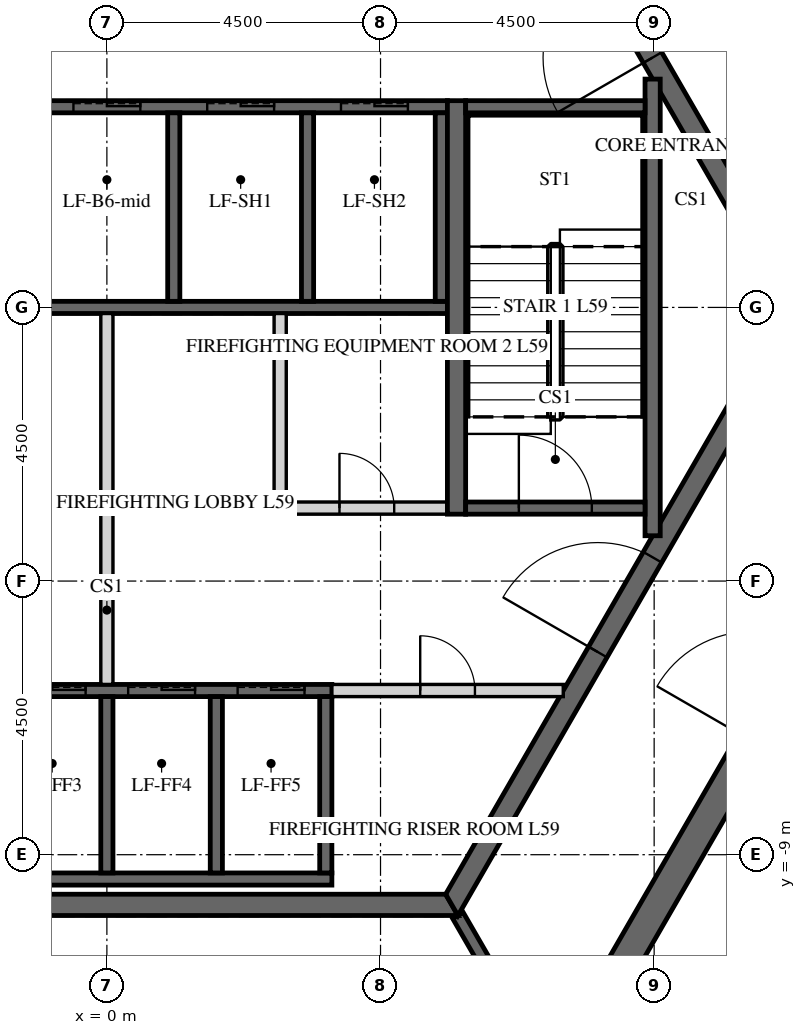
"""IFC4 building model, lengths in metres.
Left out: names, types, materials, properties, quantities, classifications, styles, units other than length and angle.
Written with IfcOpenShell. Run it as: python <this file> out.ifc"""

import sys

from ifc_helpers import new_model, si_unit, direction, frame, frame_2d, origin, place, context, subcontext, project, spatial, polyline, rectangle, outline, extrude, element, fill, save


model = new_model("IFC4")
c1 = context("Model", 3, precision=1e-05, world=origin(), true_north=direction((0.0, 1.0)))
c2 = subcontext(c1, "Body", "Model", "MODEL_VIEW")
j1 = project(units=[si_unit("LENGTHUNIT", "METRE"), si_unit("PLANEANGLEUNIT", "RADIAN")], contexts=[c1])
p1 = place(None, origin())
s1 = spatial("IfcSite", under=j1, at=p1, CompositionType="ELEMENT")
p2 = place(p1, origin())
s2 = spatial("IfcBuilding", under=s1, at=p2, CompositionType="ELEMENT")
p3 = place(p2, frame((0.0, 0.0, 246.3)))
s3 = spatial("IfcBuildingStorey", under=s2, at=p3, CompositionType="ELEMENT", Elevation=246.3)
p4 = place(p3, frame((7.361, -12.75, -0.15), z_axis=(0.0, 0.0, 1.0), x_axis=(0.50000571537, 0.866022103989, 0.0)))
e1 = element("IfcWall", 1, at=p4, inside=s3, PredefinedType="SHEAR", context=c2, shape_type="SweptSolid", body=[
    extrude(outline(polyline([(-0.144, -0.25), (14.867, -0.25), (14.578, 0.25), (0.144, 0.25), (-0.144, -0.25)])), origin(), (0.0, 0.0, 1.0), 3.75),
])
p5 = place(p4, frame((6.49, 0.0, 0.15)))
e2 = element("IfcOpeningElement", 2, at=p5, cuts=e1, PredefinedType="OPENING", context=c2, shape_type="SweptSolid", body=[
    extrude(rectangle(XDim=1.8, YDim=2.4, at=frame_2d((0.9, 1.2))), frame((0.0, 0.26, 0.0), z_axis=(0.0, -1.0, 0.0), x_axis=(1.0, 0.0, 0.0)), (0.0, 0.0, 1.0), 0.52),
])
p6 = place(p3, frame((14.722, 0.0, -0.15), z_axis=(0.0, 0.0, 1.0), x_axis=(-0.50000571537, 0.866022103989, 0.0)))
e3 = element("IfcWall", 3, at=p6, inside=s3, PredefinedType="SHEAR", context=c2, shape_type="SweptSolid", body=[
    extrude(outline(polyline([(-0.144, -0.25), (14.867, -0.25), (14.578, 0.25), (0.144, 0.25), (-0.144, -0.25)])), origin(), (0.0, 0.0, 1.0), 3.75),
])
p7 = place(p6, frame((6.432, 0.0, 0.15)))
e4 = element("IfcOpeningElement", 4, at=p7, cuts=e3, PredefinedType="OPENING", context=c2, shape_type="SweptSolid", body=[
    extrude(rectangle(XDim=1.8, YDim=2.4, at=frame_2d((0.9, 1.2))), frame((0.0, 0.26, 0.0), z_axis=(0.0, -1.0, 0.0), x_axis=(1.0, 0.0, 0.0)), (0.0, 0.0, 1.0), 0.52),
])
p8 = place(p3, frame((-5.673, -9.825, -0.15), z_axis=(0.0, 0.0, 1.0), x_axis=(1.0, 0.0, 0.0)))
e5 = element("IfcWall", 5, at=p8, inside=s3, PredefinedType="SHEAR", context=c2, shape_type="SweptSolid", body=[
    extrude(outline(polyline([(-0.101, -0.175), (11.446, -0.175), (11.244, 0.175), (0.101, 0.175), (-0.101, -0.175)])), origin(), (0.0, 0.0, 1.0), 3.75),
])
p9 = place(p3, frame((5.673, -9.825, -0.15), z_axis=(0.0, 0.0, 1.0), x_axis=(0.499995046907, 0.866028263435, 0.0)))
e6 = element("IfcWall", 6, at=p9, inside=s3, PredefinedType="SHEAR", context=c2, shape_type="SweptSolid", body=[
    extrude(outline(polyline([(-0.101, -0.175), (11.446, -0.175), (11.244, 0.175), (0.101, 0.175), (-0.101, -0.175)])), origin(), (0.0, 0.0, 1.0), 3.75),
])
p10 = place(p9, frame((4.801, 0.0, 0.15)))
e7 = element("IfcOpeningElement", 7, at=p10, cuts=e6, PredefinedType="OPENING", context=c2, shape_type="SweptSolid", body=[
    extrude(rectangle(XDim=1.8, YDim=2.4, at=frame_2d((0.9, 1.2))), frame((0.0, 0.185, 0.0), z_axis=(0.0, -1.0, 0.0), x_axis=(1.0, 0.0, 0.0)), (0.0, 0.0, 1.0), 0.37),
])
p11 = place(p3, frame((11.345, 0.0, -0.15), z_axis=(0.0, 0.0, 1.0), x_axis=(-0.499995046907, 0.866028263435, 0.0)))
e8 = element("IfcWall", 8, at=p11, inside=s3, PredefinedType="SHEAR", context=c2, shape_type="SweptSolid", body=[
    extrude(outline(polyline([(-0.101, -0.175), (11.446, -0.175), (11.244, 0.175), (0.101, 0.175), (-0.101, -0.175)])), origin(), (0.0, 0.0, 1.0), 3.75),
])
p12 = place(p11, frame((4.744, 0.0, 0.15)))
e9 = element("IfcOpeningElement", 9, at=p12, cuts=e8, PredefinedType="OPENING", context=c2, shape_type="SweptSolid", body=[
    extrude(rectangle(XDim=1.8, YDim=2.4, at=frame_2d((0.9, 1.2))), frame((0.0, 0.185, 0.0), z_axis=(0.0, -1.0, 0.0), x_axis=(1.0, 0.0, 0.0)), (0.0, 0.0, 1.0), 0.37),
])
p13 = place(p3, frame((-5.6, 3.3, -0.25), z_axis=(0.0, 0.0, 1.0), x_axis=(1.0, 0.0, 0.0)))
e10 = element("IfcWall", 10, at=p13, inside=s3, PredefinedType="SHEAR", context=c2, shape_type="SweptSolid", body=[
    extrude(rectangle(XDim=11.2, YDim=0.2, at=frame_2d((5.6, 0.0))), origin(), (0.0, 0.0, 1.0), 3.9),
])
p14 = place(p13, frame((0.65, 0.0, 0.25)))
e11 = element("IfcOpeningElement", 11, at=p14, cuts=e10, PredefinedType="OPENING", context=c2, shape_type="SweptSolid", body=[
    extrude(rectangle(XDim=1.1, YDim=2.1, at=frame_2d((0.55, 1.05))), frame((0.0, 0.11, 0.0), z_axis=(0.0, -1.0, 0.0), x_axis=(1.0, 0.0, 0.0)), (0.0, 0.0, 1.0), 0.22),
])
p15 = place(p13, frame((2.85, 0.0, 0.25)))
e12 = element("IfcOpeningElement", 12, at=p15, cuts=e10, PredefinedType="OPENING", context=c2, shape_type="SweptSolid", body=[
    extrude(rectangle(XDim=1.1, YDim=2.1, at=frame_2d((0.55, 1.05))), frame((0.0, 0.11, 0.0), z_axis=(0.0, -1.0, 0.0), x_axis=(1.0, 0.0, 0.0)), (0.0, 0.0, 1.0), 0.22),
])
p16 = place(p13, frame((5.05, 0.0, 0.25)))
e13 = element("IfcOpeningElement", 13, at=p16, cuts=e10, PredefinedType="OPENING", context=c2, shape_type="SweptSolid", body=[
    extrude(rectangle(XDim=1.1, YDim=2.1, at=frame_2d((0.55, 1.05))), frame((0.0, 0.11, 0.0), z_axis=(0.0, -1.0, 0.0), x_axis=(1.0, 0.0, 0.0)), (0.0, 0.0, 1.0), 0.22),
])
p17 = place(p13, frame((7.25, 0.0, 0.25)))
e14 = element("IfcOpeningElement", 14, at=p17, cuts=e10, PredefinedType="OPENING", context=c2, shape_type="SweptSolid", body=[
    extrude(rectangle(XDim=1.1, YDim=2.1, at=frame_2d((0.55, 1.05))), frame((0.0, 0.11, 0.0), z_axis=(0.0, -1.0, 0.0), x_axis=(1.0, 0.0, 0.0)), (0.0, 0.0, 1.0), 0.22),
])
p18 = place(p13, frame((9.45, 0.0, 0.25)))
e15 = element("IfcOpeningElement", 15, at=p18, cuts=e10, PredefinedType="OPENING", context=c2, shape_type="SweptSolid", body=[
    extrude(rectangle(XDim=1.1, YDim=2.1, at=frame_2d((0.55, 1.05))), frame((0.0, 0.11, 0.0), z_axis=(0.0, -1.0, 0.0), x_axis=(1.0, 0.0, 0.0)), (0.0, 0.0, 1.0), 0.22),
])
p19 = place(p3, frame((-5.6, 0.0, -0.25), z_axis=(0.0, 0.0, 1.0), x_axis=(1.0, 0.0, 0.0)))
e16 = element("IfcWall", 16, at=p19, inside=s3, PredefinedType="SHEAR", context=c2, shape_type="SweptSolid", body=[
    extrude(rectangle(XDim=11.2, YDim=0.2, at=frame_2d((5.6, 0.0))), origin(), (0.0, 0.0, 1.0), 3.9),
])
for number, where, z_axis, x_axis in (
    (17, (1.1, 0.1, -0.25), (0.0, 0.0, 1.0), (0.0, 1.0, 0.0)),
    (18, (3.3, 0.1, -0.25), (0.0, 0.0, 1.0), (0.0, 1.0, 0.0)),
    (19, (5.5, 0.1, -0.25), (0.0, 0.0, 1.0), (0.0, 1.0, 0.0)),
):
    element("IfcWall", number, at=place(p3, frame(where, z_axis=z_axis, x_axis=x_axis)), inside=s3, PredefinedType="SHEAR", context=c2, shape_type="SweptSolid", body=[
        extrude(rectangle(XDim=3.1, YDim=0.2, at=frame_2d((1.55, 0.0))), origin(), (0.0, 0.0, 1.0), 3.9),
    ])
p20 = place(p3, frame((-5.5, -6.3, -0.25), z_axis=(0.0, 0.0, 1.0), x_axis=(1.0, 0.0, 0.0)))
e20 = element("IfcWall", 20, at=p20, inside=s3, PredefinedType="SHEAR", context=c2, shape_type="SweptSolid", body=[
    extrude(rectangle(XDim=9.2, YDim=0.2, at=frame_2d((4.6, 0.0))), origin(), (0.0, 0.0, 1.0), 3.9),
])
p21 = place(p20, frame((0.45, 0.0, 0.25)))
e21 = element("IfcOpeningElement", 21, at=p21, cuts=e20, PredefinedType="OPENING", context=c2, shape_type="SweptSolid", body=[
    extrude(rectangle(XDim=1.1, YDim=2.1, at=frame_2d((0.55, 1.05))), frame((0.0, 0.11, 0.0), z_axis=(0.0, -1.0, 0.0), x_axis=(1.0, 0.0, 0.0)), (0.0, 0.0, 1.0), 0.22),
])
p22 = place(p20, frame((2.25, 0.0, 0.25)))
e22 = element("IfcOpeningElement", 22, at=p22, cuts=e20, PredefinedType="OPENING", context=c2, shape_type="SweptSolid", body=[
    extrude(rectangle(XDim=1.1, YDim=2.1, at=frame_2d((0.55, 1.05))), frame((0.0, 0.11, 0.0), z_axis=(0.0, -1.0, 0.0), x_axis=(1.0, 0.0, 0.0)), (0.0, 0.0, 1.0), 0.22),
])
p23 = place(p20, frame((4.05, 0.0, 0.25)))
e23 = element("IfcOpeningElement", 23, at=p23, cuts=e20, PredefinedType="OPENING", context=c2, shape_type="SweptSolid", body=[
    extrude(rectangle(XDim=1.1, YDim=2.1, at=frame_2d((0.55, 1.05))), frame((0.0, 0.11, 0.0), z_axis=(0.0, -1.0, 0.0), x_axis=(1.0, 0.0, 0.0)), (0.0, 0.0, 1.0), 0.22),
])
p24 = place(p20, frame((5.85, 0.0, 0.25)))
e24 = element("IfcOpeningElement", 24, at=p24, cuts=e20, PredefinedType="OPENING", context=c2, shape_type="SweptSolid", body=[
    extrude(rectangle(XDim=1.1, YDim=2.1, at=frame_2d((0.55, 1.05))), frame((0.0, 0.11, 0.0), z_axis=(0.0, -1.0, 0.0), x_axis=(1.0, 0.0, 0.0)), (0.0, 0.0, 1.0), 0.22),
])
p25 = place(p20, frame((7.65, 0.0, 0.25)))
e25 = element("IfcOpeningElement", 25, at=p25, cuts=e20, PredefinedType="OPENING", context=c2, shape_type="SweptSolid", body=[
    extrude(rectangle(XDim=1.1, YDim=2.1, at=frame_2d((0.55, 1.05))), frame((0.0, 0.11, 0.0), z_axis=(0.0, -1.0, 0.0), x_axis=(1.0, 0.0, 0.0)), (0.0, 0.0, 1.0), 0.22),
])
p26 = place(p3, frame((-5.5, -9.4, -0.25), z_axis=(0.0, 0.0, 1.0), x_axis=(1.0, 0.0, 0.0)))
e26 = element("IfcWall", 26, at=p26, inside=s3, PredefinedType="SHEAR", context=c2, shape_type="SweptSolid", body=[
    extrude(rectangle(XDim=9.2, YDim=0.2, at=frame_2d((4.6, 0.0))), origin(), (0.0, 0.0, 1.0), 3.9),
])
for number, where, z_axis, x_axis in (
    (27, (0.0, -9.3, -0.25), (0.0, 0.0, 1.0), (0.0, 1.0, 0.0)),
    (28, (1.8, -9.3, -0.25), (0.0, 0.0, 1.0), (0.0, 1.0, 0.0)),
    (29, (3.6, -9.3, -0.25), (0.0, 0.0, 1.0), (0.0, 1.0, 0.0)),
):
    element("IfcWall", number, at=place(p3, frame(where, z_axis=z_axis, x_axis=x_axis)), inside=s3, PredefinedType="SHEAR", context=c2, shape_type="SweptSolid", body=[
        extrude(rectangle(XDim=2.9, YDim=0.2, at=frame_2d((1.45, 0.0))), origin(), (0.0, 0.0, 1.0), 3.9),
    ])
p27 = place(p3, frame((2.75, -3.3, 0.0), z_axis=(0.0, 0.0, 1.0), x_axis=(1.0, 0.0, 0.0)))
e30 = element("IfcWall", 30, at=p27, inside=s3, PredefinedType="PARTITIONING", context=c2, shape_type="SweptSolid", body=[
    extrude(rectangle(XDim=2.85, YDim=0.2, at=frame_2d((1.425, 0.0))), origin(), (0.0, 0.0, 1.0), 3.65),
])
p28 = place(p27, frame((1.075, 0.0, 0.0)))
e31 = element("IfcOpeningElement", 31, at=p28, cuts=e30, PredefinedType="OPENING", context=c2, shape_type="SweptSolid", body=[
    extrude(rectangle(XDim=0.9, YDim=2.1, at=frame_2d((0.45, 1.05))), frame((0.0, 0.11, 0.0), z_axis=(0.0, -1.0, 0.0), x_axis=(1.0, 0.0, 0.0)), (0.0, 0.0, 1.0), 0.22),
])
p29 = place(p3, frame((2.85, -3.2, 0.0), z_axis=(0.0, 0.0, 1.0), x_axis=(0.0, 1.0, 0.0)))
e32 = element("IfcWall", 32, at=p29, inside=s3, PredefinedType="PARTITIONING", context=c2, shape_type="SweptSolid", body=[
    extrude(rectangle(XDim=3.1, YDim=0.2, at=frame_2d((1.55, 0.0))), origin(), (0.0, 0.0, 1.0), 3.65),
])
p30 = place(p3, frame((0.0, -6.2, 0.0), z_axis=(0.0, 0.0, 1.0), x_axis=(0.0, 1.0, 0.0)))
e33 = element("IfcWall", 33, at=p30, inside=s3, PredefinedType="PARTITIONING", context=c2, shape_type="SweptSolid", body=[
    extrude(rectangle(XDim=6.1, YDim=0.2, at=frame_2d((3.05, 0.0))), origin(), (0.0, 0.0, 1.0), 3.65),
])
p31 = place(p3, frame((3.7, -6.3, 0.0), z_axis=(0.0, 0.0, 1.0), x_axis=(1.0, 0.0, 0.0)))
e34 = element("IfcWall", 34, at=p31, inside=s3, PredefinedType="PARTITIONING", context=c2, shape_type="SweptSolid", body=[
    extrude(rectangle(XDim=3.806, YDim=0.2, at=frame_2d((1.903, 0.0))), origin(), (0.0, 0.0, 1.0), 3.65),
])
p32 = place(p31, frame((1.453, 0.0, 0.0)))
e35 = element("IfcOpeningElement", 35, at=p32, cuts=e34, PredefinedType="OPENING", context=c2, shape_type="SweptSolid", body=[
    extrude(rectangle(XDim=0.9, YDim=2.1, at=frame_2d((0.45, 1.05))), frame((0.0, 0.11, 0.0), z_axis=(0.0, -1.0, 0.0), x_axis=(1.0, 0.0, 0.0)), (0.0, 0.0, 1.0), 0.22),
])
p33 = place(p3, frame((5.773, -10.0, -0.15), z_axis=(0.0, 0.0, 1.0), x_axis=(0.499995765644, -0.866027848477, 0.0)))
e36 = element("IfcWall", 36, at=p33, inside=s3, PredefinedType="SHEAR", context=c2, shape_type="SweptSolid", body=[
    extrude(rectangle(XDim=2.887, YDim=0.2, at=frame_2d((1.443, 0.0))), origin(), (0.0, 0.0, 1.0), 3.75),
])
p34 = place(p3, frame((5.75, -3.4, -0.25), z_axis=(0.0, 0.0, 1.0), x_axis=(0.0, 1.0, 0.0)))
e37 = element("IfcWall", 37, at=p34, inside=s3, PredefinedType="SHEAR", context=c2, shape_type="SweptSolid", body=[
    extrude(rectangle(XDim=6.8, YDim=0.3, at=frame_2d((3.4, 0.0))), origin(), (0.0, 0.0, 1.0), 3.9),
])
p35 = place(p3, frame((8.975, -3.755, -0.25), z_axis=(0.0, 0.0, 1.0), x_axis=(0.0, 1.0, 0.0)))
e38 = element("IfcWall", 38, at=p35, inside=s3, PredefinedType="SHEAR", context=c2, shape_type="SweptSolid", body=[
    extrude(rectangle(XDim=7.51, YDim=0.25, at=frame_2d((3.755, 0.0))), origin(), (0.0, 0.0, 1.0), 3.9),
])
p36 = place(p3, frame((5.9, 3.3, -0.25), z_axis=(0.0, 0.0, 1.0), x_axis=(1.0, 0.0, 0.0)))
e39 = element("IfcWall", 39, at=p36, inside=s3, PredefinedType="SHEAR", context=c2, shape_type="SweptSolid", body=[
    extrude(rectangle(XDim=2.95, YDim=0.2, at=frame_2d((1.475, 0.0))), origin(), (0.0, 0.0, 1.0), 3.9),
])
p37 = place(p3, frame((5.9, -3.3, -0.25), z_axis=(0.0, 0.0, 1.0), x_axis=(1.0, 0.0, 0.0)))
e40 = element("IfcWall", 40, at=p37, inside=s3, PredefinedType="SHEAR", context=c2, shape_type="SweptSolid", body=[
    extrude(rectangle(XDim=2.95, YDim=0.2, at=frame_2d((1.475, 0.0))), origin(), (0.0, 0.0, 1.0), 3.9),
])
p38 = place(p37, frame((0.875, 0.0, 0.25)))
e41 = element("IfcOpeningElement", 41, at=p38, cuts=e40, PredefinedType="OPENING", context=c2, shape_type="SweptSolid", body=[
    extrude(rectangle(XDim=1.2, YDim=2.4, at=frame_2d((0.6, 1.2))), frame((0.0, 0.11, 0.0), z_axis=(0.0, -1.0, 0.0), x_axis=(1.0, 0.0, 0.0)), (0.0, 0.0, 1.0), 0.22),
])
p39 = place(p3, frame((9.887, -12.875, 0.0), z_axis=(0.0, 0.0, 1.0), x_axis=(0.499998228944, 0.866026426302, 0.0)))
e42 = element("IfcWall", 42, at=p39, inside=s3, PredefinedType="PARTITIONING", context=c2, shape_type="SweptSolid", body=[
    extrude(rectangle(XDim=14.867, YDim=0.15, at=frame_2d((7.433, 0.0))), origin(), (0.0, 0.0, 1.0), 2.838),
])
p40 = place(p39, frame((3.519, 0.0, 0.0)))
e43 = element("IfcOpeningElement", 43, at=p40, cuts=e42, PredefinedType="OPENING", context=c2, shape_type="SweptSolid", body=[
    extrude(rectangle(XDim=1.0, YDim=2.1, at=frame_2d((0.5, 1.05))), frame((0.0, 0.085, 0.0), z_axis=(0.0, -1.0, 0.0), x_axis=(1.0, 0.0, 0.0)), (0.0, 0.0, 1.0), 0.17),
])
p41 = place(p39, frame((7.324, 0.0, 0.0)))
e44 = element("IfcOpeningElement", 44, at=p41, cuts=e42, PredefinedType="OPENING", context=c2, shape_type="SweptSolid", body=[
    extrude(rectangle(XDim=1.0, YDim=2.1, at=frame_2d((0.5, 1.05))), frame((0.0, 0.085, 0.0), z_axis=(0.0, -1.0, 0.0), x_axis=(1.0, 0.0, 0.0)), (0.0, 0.0, 1.0), 0.17),
])
p42 = place(p39, frame((13.717, 0.0, 0.0)))
e45 = element("IfcOpeningElement", 45, at=p42, cuts=e42, PredefinedType="OPENING", context=c2, shape_type="SweptSolid", body=[
    extrude(rectangle(XDim=1.0, YDim=2.1, at=frame_2d((0.5, 1.05))), frame((0.0, 0.085, 0.0), z_axis=(0.0, -1.0, 0.0), x_axis=(1.0, 0.0, 0.0)), (0.0, 0.0, 1.0), 0.17),
])
p43 = place(p3, frame((17.277, 0.075, 0.0), z_axis=(0.0, 0.0, 1.0), x_axis=(-0.499998228944, 0.866026426302, 0.0)))
e46 = element("IfcWall", 46, at=p43, inside=s3, PredefinedType="PARTITIONING", context=c2, shape_type="SweptSolid", body=[
    extrude(rectangle(XDim=14.867, YDim=0.15, at=frame_2d((7.433, 0.0))), origin(), (0.0, 0.0, 1.0), 2.838),
])
p44 = place(p43, frame((4.345, 0.0, 0.0)))
e47 = element("IfcOpeningElement", 47, at=p44, cuts=e46, PredefinedType="OPENING", context=c2, shape_type="SweptSolid", body=[
    extrude(rectangle(XDim=1.0, YDim=2.1, at=frame_2d((0.5, 1.05))), frame((0.0, 0.085, 0.0), z_axis=(0.0, -1.0, 0.0), x_axis=(1.0, 0.0, 0.0)), (0.0, 0.0, 1.0), 0.17),
])
p45 = place(p43, frame((8.51, 0.0, 0.0)))
e48 = element("IfcOpeningElement", 48, at=p45, cuts=e46, PredefinedType="OPENING", context=c2, shape_type="SweptSolid", body=[
    extrude(rectangle(XDim=1.0, YDim=2.1, at=frame_2d((0.5, 1.05))), frame((0.0, 0.085, 0.0), z_axis=(0.0, -1.0, 0.0), x_axis=(1.0, 0.0, 0.0)), (0.0, 0.0, 1.0), 0.17),
])
p46 = place(p12, origin())
e49 = element("IfcDoor", 49, at=p46, inside=s3, OperationType="DOUBLE_DOOR_SINGLE_SWING", PredefinedType="DOOR", context=c2, shape_type="SweptSolid", body=[
    extrude(rectangle(XDim=1.8, YDim=2.4, at=frame_2d((0.9, 1.2))), frame((0.0, 0.025, 0.0), z_axis=(0.0, -1.0, 0.0), x_axis=(1.0, 0.0, 0.0)), (0.0, 0.0, 1.0), 0.05),
])
fill(e9, e49)
p47 = place(p10, origin())
e50 = element("IfcDoor", 50, at=p47, inside=s3, OperationType="DOUBLE_DOOR_SINGLE_SWING", PredefinedType="DOOR", context=c2, shape_type="SweptSolid", body=[
    extrude(rectangle(XDim=1.8, YDim=2.4, at=frame_2d((0.9, 1.2))), frame((0.0, 0.025, 0.0), z_axis=(0.0, -1.0, 0.0), x_axis=(1.0, 0.0, 0.0)), (0.0, 0.0, 1.0), 0.05),
])
fill(e7, e50)
p48 = place(p28, origin())
e51 = element("IfcDoor", 51, at=p48, inside=s3, OperationType="SINGLE_SWING_LEFT", PredefinedType="DOOR", context=c2, shape_type="SweptSolid", body=[
    extrude(rectangle(XDim=0.9, YDim=2.1, at=frame_2d((0.45, 1.05))), frame((0.0, 0.025, 0.0), z_axis=(0.0, -1.0, 0.0), x_axis=(1.0, 0.0, 0.0)), (0.0, 0.0, 1.0), 0.05),
])
fill(e31, e51)
p49 = place(p32, origin())
e52 = element("IfcDoor", 52, at=p49, inside=s3, OperationType="SINGLE_SWING_LEFT", PredefinedType="DOOR", context=c2, shape_type="SweptSolid", body=[
    extrude(rectangle(XDim=0.9, YDim=2.1, at=frame_2d((0.45, 1.05))), frame((0.0, 0.025, 0.0), z_axis=(0.0, -1.0, 0.0), x_axis=(1.0, 0.0, 0.0)), (0.0, 0.0, 1.0), 0.05),
])
fill(e35, e52)
p50 = place(p38, origin())
e53 = element("IfcDoor", 53, at=p50, inside=s3, OperationType="SINGLE_SWING_LEFT", PredefinedType="DOOR", context=c2, shape_type="SweptSolid", body=[
    extrude(rectangle(XDim=1.2, YDim=2.4, at=frame_2d((0.6, 1.2))), frame((0.0, 0.025, 0.0), z_axis=(0.0, -1.0, 0.0), x_axis=(1.0, 0.0, 0.0)), (0.0, 0.0, 1.0), 0.05),
])
fill(e41, e53)
p51 = place(p16, origin())
e54 = element("IfcDoor", 54, at=p51, inside=s3, OperationType="SLIDING_TO_LEFT", PredefinedType="DOOR", context=c2, shape_type="SweptSolid", body=[
    extrude(rectangle(XDim=1.1, YDim=2.1, at=frame_2d((0.55, 1.05))), frame((0.0, 0.025, 0.0), z_axis=(0.0, -1.0, 0.0), x_axis=(1.0, 0.0, 0.0)), (0.0, 0.0, 1.0), 0.05),
])
fill(e13, e54)
p52 = place(p17, origin())
e55 = element("IfcDoor", 55, at=p52, inside=s3, OperationType="SLIDING_TO_LEFT", PredefinedType="DOOR", context=c2, shape_type="SweptSolid", body=[
    extrude(rectangle(XDim=1.1, YDim=2.1, at=frame_2d((0.55, 1.05))), frame((0.0, 0.025, 0.0), z_axis=(0.0, -1.0, 0.0), x_axis=(1.0, 0.0, 0.0)), (0.0, 0.0, 1.0), 0.05),
])
fill(e14, e55)
p53 = place(p18, origin())
e56 = element("IfcDoor", 56, at=p53, inside=s3, OperationType="SLIDING_TO_LEFT", PredefinedType="DOOR", context=c2, shape_type="SweptSolid", body=[
    extrude(rectangle(XDim=1.1, YDim=2.1, at=frame_2d((0.55, 1.05))), frame((0.0, 0.025, 0.0), z_axis=(0.0, -1.0, 0.0), x_axis=(1.0, 0.0, 0.0)), (0.0, 0.0, 1.0), 0.05),
])
fill(e15, e56)
p54 = place(p23, origin())
e57 = element("IfcDoor", 57, at=p54, inside=s3, OperationType="SLIDING_TO_LEFT", PredefinedType="DOOR", context=c2, shape_type="SweptSolid", body=[
    extrude(rectangle(XDim=1.1, YDim=2.1, at=frame_2d((0.55, 1.05))), frame((0.0, 0.025, 0.0), z_axis=(0.0, -1.0, 0.0), x_axis=(1.0, 0.0, 0.0)), (0.0, 0.0, 1.0), 0.05),
])
fill(e23, e57)
p55 = place(p24, origin())
e58 = element("IfcDoor", 58, at=p55, inside=s3, OperationType="SLIDING_TO_LEFT", PredefinedType="DOOR", context=c2, shape_type="SweptSolid", body=[
    extrude(rectangle(XDim=1.1, YDim=2.1, at=frame_2d((0.55, 1.05))), frame((0.0, 0.025, 0.0), z_axis=(0.0, -1.0, 0.0), x_axis=(1.0, 0.0, 0.0)), (0.0, 0.0, 1.0), 0.05),
])
fill(e24, e58)
p56 = place(p25, origin())
e59 = element("IfcDoor", 59, at=p56, inside=s3, OperationType="SLIDING_TO_LEFT", PredefinedType="DOOR", context=c2, shape_type="SweptSolid", body=[
    extrude(rectangle(XDim=1.1, YDim=2.1, at=frame_2d((0.55, 1.05))), frame((0.0, 0.025, 0.0), z_axis=(0.0, -1.0, 0.0), x_axis=(1.0, 0.0, 0.0)), (0.0, 0.0, 1.0), 0.05),
])
fill(e25, e59)
save(model, sys.argv[1])
